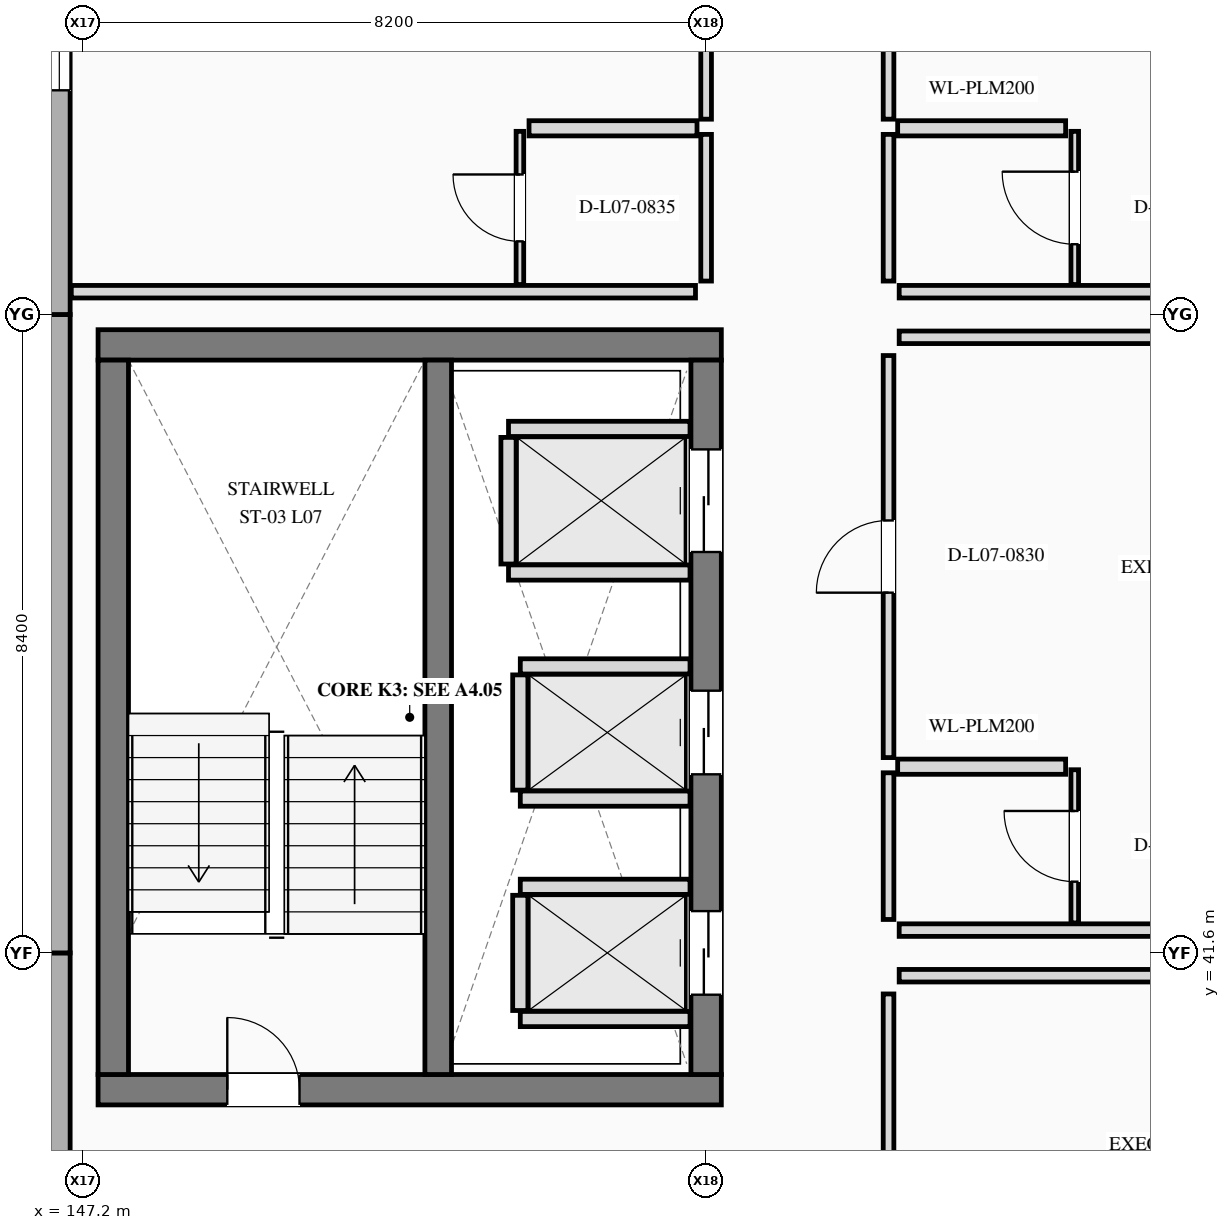
"""IFC4 building model, lengths in metres.
Left out: names, types, materials, properties, quantities, classifications, styles, units other than length and angle.
Written with IfcOpenShell. Run it as: python <this file> out.ifc"""

import sys

from ifc_helpers import new_model, si_unit, direction, frame, frame_2d, origin, place, context, subcontext, project, spatial, rectangle, extrude, element, fill, save


model = new_model("IFC4")
c1 = context("Model", 3, precision=1e-05, world=origin(), true_north=direction((0.0, 1.0)))
c2 = subcontext(c1, "Body", "Model", "MODEL_VIEW")
j1 = project(units=[si_unit("LENGTHUNIT", "METRE"), si_unit("PLANEANGLEUNIT", "RADIAN")], contexts=[c1])
p1 = place(None, origin())
s1 = spatial("IfcSite", under=j1, at=p1, CompositionType="ELEMENT")
p2 = place(p1, origin())
s2 = spatial("IfcBuilding", under=s1, at=p2, CompositionType="ELEMENT")
p3 = place(p2, frame((0.0, 0.0, 30.6)))
s3 = spatial("IfcBuildingStorey", under=s2, at=p3, CompositionType="ELEMENT", Elevation=30.6)
p4 = place(p3, frame((146.89, 33.2, 0.0), z_axis=(0.0, 0.0, 1.0), x_axis=(0.0, 1.0, 0.0)))
e1 = element("IfcWall", 1, at=p4, inside=s3, PredefinedType="STANDARD", context=c2, shape_type="SweptSolid", body=[
    extrude(rectangle(XDim=8.4, YDim=0.285, at=frame_2d((4.2, 0.0))), origin(), (0.0, 0.0, 1.0), 3.5),
])
p5 = place(p3, frame((146.89, 41.6, 0.0), z_axis=(0.0, 0.0, 1.0), x_axis=(0.0, 1.0, 0.0)))
e2 = element("IfcWall", 2, at=p5, inside=s3, PredefinedType="STANDARD", context=c2, shape_type="SweptSolid", body=[
    extrude(rectangle(XDim=8.4, YDim=0.285, at=frame_2d((4.2, 0.0))), origin(), (0.0, 0.0, 1.0), 3.5),
])
p6 = place(p3, frame((146.89, 50.0, 0.0), z_axis=(0.0, 0.0, 1.0), x_axis=(0.0, 1.0, 0.0)))
e3 = element("IfcWall", 3, at=p6, inside=s3, PredefinedType="STANDARD", context=c2, shape_type="SweptSolid", body=[
    extrude(rectangle(XDim=8.4, YDim=0.285, at=frame_2d((4.2, 0.0))), origin(), (0.0, 0.0, 1.0), 3.5),
])
p7 = place(p6, frame((2.95, 0.0, 0.85)))
e4 = element("IfcOpeningElement", 4, at=p7, cuts=e3, PredefinedType="OPENING", context=c2, shape_type="SweptSolid", body=[
    extrude(rectangle(XDim=2.5, YDim=1.75, at=frame_2d((1.25, 0.875))), frame((0.0, 0.152, 0.0), z_axis=(0.0, -1.0, 0.0), x_axis=(1.0, 0.0, 0.0)), (0.0, 0.0, 1.0), 0.305),
])
p8 = place(p3, frame((147.4, 39.8, 0.0), z_axis=(0.0, 0.0, 1.0), x_axis=(1.0, 0.0, 0.0)))
e5 = element("IfcWall", 5, at=p8, inside=s3, PredefinedType="SHEAR", context=c2, shape_type="SweptSolid", body=[
    extrude(rectangle(XDim=8.2, YDim=0.4, at=frame_2d((4.1, 0.0))), origin(), (0.0, 0.0, 1.0), 3.5),
])
p9 = place(p8, frame((1.7, 0.0, 0.0)))
e6 = element("IfcOpeningElement", 6, at=p9, cuts=e5, PredefinedType="OPENING", context=c2, shape_type="SweptSolid", body=[
    extrude(rectangle(XDim=0.95, YDim=2.2, at=frame_2d((0.475, 1.1))), frame((0.0, 0.21, 0.0), z_axis=(0.0, -1.0, 0.0), x_axis=(1.0, 0.0, 0.0)), (0.0, 0.0, 1.0), 0.42),
])
p10 = place(p3, frame((155.6, 49.6, 0.0), z_axis=(0.0, 0.0, 1.0), x_axis=(-1.0, 0.0, 0.0)))
e7 = element("IfcWall", 7, at=p10, inside=s3, PredefinedType="SHEAR", context=c2, shape_type="SweptSolid", body=[
    extrude(rectangle(XDim=8.2, YDim=0.4, at=frame_2d((4.1, 0.0))), origin(), (0.0, 0.0, 1.0), 3.5),
])
p11 = place(p3, frame((147.6, 49.4, 0.0), z_axis=(0.0, 0.0, 1.0), x_axis=(0.0, -1.0, 0.0)))
e8 = element("IfcWall", 8, at=p11, inside=s3, PredefinedType="SHEAR", context=c2, shape_type="SweptSolid", body=[
    extrude(rectangle(XDim=9.4, YDim=0.4, at=frame_2d((4.7, 0.0))), origin(), (0.0, 0.0, 1.0), 3.5),
])
p12 = place(p3, frame((155.4, 40.0, 0.0), z_axis=(0.0, 0.0, 1.0), x_axis=(0.0, 1.0, 0.0)))
e9 = element("IfcWall", 9, at=p12, inside=s3, PredefinedType="SHEAR", context=c2, shape_type="SweptSolid", body=[
    extrude(rectangle(XDim=9.4, YDim=0.4, at=frame_2d((4.7, 0.0))), origin(), (0.0, 0.0, 1.0), 3.5),
])
p13 = place(p12, frame((1.05, 0.0, 0.0)))
e10 = element("IfcOpeningElement", 10, at=p13, cuts=e9, PredefinedType="OPENING", context=c2, shape_type="SweptSolid", body=[
    extrude(rectangle(XDim=1.1, YDim=2.2, at=frame_2d((0.55, 1.1))), frame((0.0, 0.21, 0.0), z_axis=(0.0, -1.0, 0.0), x_axis=(1.0, 0.0, 0.0)), (0.0, 0.0, 1.0), 0.42),
])
p14 = place(p12, frame((3.95, 0.0, 0.0)))
e11 = element("IfcOpeningElement", 11, at=p14, cuts=e9, PredefinedType="OPENING", context=c2, shape_type="SweptSolid", body=[
    extrude(rectangle(XDim=1.1, YDim=2.2, at=frame_2d((0.55, 1.1))), frame((0.0, 0.21, 0.0), z_axis=(0.0, -1.0, 0.0), x_axis=(1.0, 0.0, 0.0)), (0.0, 0.0, 1.0), 0.42),
])
p15 = place(p12, frame((6.875, 0.0, 0.0)))
e12 = element("IfcOpeningElement", 12, at=p15, cuts=e9, PredefinedType="OPENING", context=c2, shape_type="SweptSolid", body=[
    extrude(rectangle(XDim=1.35, YDim=2.3, at=frame_2d((0.675, 1.15))), frame((0.0, 0.21, 0.0), z_axis=(0.0, -1.0, 0.0), x_axis=(1.0, 0.0, 0.0)), (0.0, 0.0, 1.0), 0.42),
])
p16 = place(p3, frame((151.875, 40.0, 0.0), z_axis=(0.0, 0.0, 1.0), x_axis=(0.0, 1.0, 0.0)))
e13 = element("IfcWall", 13, at=p16, inside=s3, PredefinedType="SHEAR", context=c2, shape_type="SweptSolid", body=[
    extrude(rectangle(XDim=9.4, YDim=0.35, at=frame_2d((4.7, 0.0))), origin(), (0.0, 0.0, 1.0), 3.5),
])
for number, where, z_axis, x_axis in (
    (14, (152.955, 40.73, 0.0), (0.0, 0.0, 1.0), (1.0, 0.0, 0.0)),
    (15, (152.955, 42.47, 0.0), (0.0, 0.0, 1.0), (1.0, 0.0, 0.0)),
):
    element("IfcWall", number, at=place(p3, frame(where, z_axis=z_axis, x_axis=x_axis)), inside=s3, PredefinedType="PLUMBINGWALL", context=c2, shape_type="SweptSolid", body=[
        extrude(rectangle(XDim=2.233, YDim=0.2, at=frame_2d((1.116, 0.0))), origin(), (0.0, 0.0, 1.0), 3.2),
    ])
p17 = place(p3, frame((152.955, 40.842, 0.0), z_axis=(0.0, 0.0, 1.0), x_axis=(0.0, 1.0, 0.0)))
e16 = element("IfcWall", 16, at=p17, inside=s3, PredefinedType="PLUMBINGWALL", context=c2, shape_type="SweptSolid", body=[
    extrude(rectangle(XDim=1.516, YDim=0.2, at=frame_2d((0.758, 0.0))), origin(), (0.0, 0.0, 1.0), 3.2),
])
for number, where, z_axis, x_axis in (
    (17, (152.955, 43.63, 0.0), (0.0, 0.0, 1.0), (1.0, 0.0, 0.0)),
    (18, (152.955, 45.37, 0.0), (0.0, 0.0, 1.0), (1.0, 0.0, 0.0)),
):
    element("IfcWall", number, at=place(p3, frame(where, z_axis=z_axis, x_axis=x_axis)), inside=s3, PredefinedType="PLUMBINGWALL", context=c2, shape_type="SweptSolid", body=[
        extrude(rectangle(XDim=2.233, YDim=0.2, at=frame_2d((1.116, 0.0))), origin(), (0.0, 0.0, 1.0), 3.2),
    ])
p18 = place(p3, frame((152.955, 43.742, 0.0), z_axis=(0.0, 0.0, 1.0), x_axis=(0.0, 1.0, 0.0)))
e19 = element("IfcWall", 19, at=p18, inside=s3, PredefinedType="PLUMBINGWALL", context=c2, shape_type="SweptSolid", body=[
    extrude(rectangle(XDim=1.516, YDim=0.2, at=frame_2d((0.758, 0.0))), origin(), (0.0, 0.0, 1.0), 3.2),
])
for number, where, z_axis, x_axis in (
    (20, (152.8, 46.605, 0.0), (0.0, 0.0, 1.0), (1.0, 0.0, 0.0)),
    (21, (152.8, 48.495, 0.0), (0.0, 0.0, 1.0), (1.0, 0.0, 0.0)),
):
    element("IfcWall", number, at=place(p3, frame(where, z_axis=z_axis, x_axis=x_axis)), inside=s3, PredefinedType="PLUMBINGWALL", context=c2, shape_type="SweptSolid", body=[
        extrude(rectangle(XDim=2.388, YDim=0.2, at=frame_2d((1.194, 0.0))), origin(), (0.0, 0.0, 1.0), 3.2),
    ])
p19 = place(p3, frame((152.8, 46.717, 0.0), z_axis=(0.0, 0.0, 1.0), x_axis=(0.0, 1.0, 0.0)))
e22 = element("IfcWall", 22, at=p19, inside=s3, PredefinedType="PLUMBINGWALL", context=c2, shape_type="SweptSolid", body=[
    extrude(rectangle(XDim=1.666, YDim=0.2, at=frame_2d((0.833, 0.0))), origin(), (0.0, 0.0, 1.0), 3.2),
])
p20 = place(p3, frame((157.8, 35.77, 0.0), z_axis=(0.0, 0.0, 1.0), x_axis=(0.0, 1.0, 0.0)))
e23 = element("IfcWall", 23, at=p20, inside=s3, PredefinedType="PARTITIONING", context=c2, shape_type="SweptSolid", body=[
    extrude(rectangle(XDim=5.29, YDim=0.14, at=frame_2d((2.645, 0.0))), origin(), (0.0, 0.0, 1.0), 3.2),
])
p21 = place(p20, frame((2.11, 0.0, 0.0)))
e24 = element("IfcOpeningElement", 24, at=p21, cuts=e23, PredefinedType="OPENING", context=c2, shape_type="SweptSolid", body=[
    extrude(rectangle(XDim=1.07, YDim=2.4, at=frame_2d((0.535, 1.2))), frame((0.0, 0.08, 0.0), z_axis=(0.0, -1.0, 0.0), x_axis=(1.0, 0.0, 0.0)), (0.0, 0.0, 1.0), 0.16),
])
p22 = place(p3, frame((157.94, 41.3, 0.0), z_axis=(0.0, 0.0, 1.0), x_axis=(1.0, 0.0, 0.0)))
e25 = element("IfcWall", 25, at=p22, inside=s3, PredefinedType="PARTITIONING", context=c2, shape_type="SweptSolid", body=[
    extrude(rectangle(XDim=8.213, YDim=0.165, at=frame_2d((4.106, 0.0))), origin(), (0.0, 0.0, 1.0), 2.59),
])
p23 = place(p3, frame((157.8, 42.04, 0.0), z_axis=(0.0, 0.0, 1.0), x_axis=(0.0, 1.0, 0.0)))
e26 = element("IfcWall", 26, at=p23, inside=s3, PredefinedType="PARTITIONING", context=c2, shape_type="SweptSolid", body=[
    extrude(rectangle(XDim=1.93, YDim=0.14, at=frame_2d((0.965, 0.0))), origin(), (0.0, 0.0, 1.0), 2.753),
])
p24 = place(p3, frame((157.8, 44.17, 0.0), z_axis=(0.0, 0.0, 1.0), x_axis=(0.0, 1.0, 0.0)))
e27 = element("IfcWall", 27, at=p24, inside=s3, PredefinedType="PARTITIONING", context=c2, shape_type="SweptSolid", body=[
    extrude(rectangle(XDim=5.29, YDim=0.14, at=frame_2d((2.645, 0.0))), origin(), (0.0, 0.0, 1.0), 2.753),
])
p25 = place(p24, frame((2.17, 0.0, 0.0)))
e28 = element("IfcOpeningElement", 28, at=p25, cuts=e27, PredefinedType="OPENING", context=c2, shape_type="SweptSolid", body=[
    extrude(rectangle(XDim=0.95, YDim=2.15, at=frame_2d((0.475, 1.075))), frame((0.0, 0.08, 0.0), z_axis=(0.0, -1.0, 0.0), x_axis=(1.0, 0.0, 0.0)), (0.0, 0.0, 1.0), 0.16),
])
for number, where, z_axis, x_axis in (
    (29, (157.94, 41.9, 0.0), (0.0, 0.0, 1.0), (1.0, 0.0, 0.0)),
    (30, (157.94, 49.7, 0.0), (0.0, 0.0, 1.0), (1.0, 0.0, 0.0)),
):
    element("IfcWall", number, at=place(p3, frame(where, z_axis=z_axis, x_axis=x_axis)), inside=s3, PredefinedType="PARTITIONING", context=c2, shape_type="SweptSolid", body=[
        extrude(rectangle(XDim=8.213, YDim=0.165, at=frame_2d((4.106, 0.0))), origin(), (0.0, 0.0, 1.0), 2.59),
    ])
p26 = place(p3, frame((157.92, 44.05, 0.0), z_axis=(0.0, 0.0, 1.0), x_axis=(1.0, 0.0, 0.0)))
e31 = element("IfcWall", 31, at=p26, inside=s3, PredefinedType="PLUMBINGWALL", context=c2, shape_type="SweptSolid", body=[
    extrude(rectangle(XDim=2.21, YDim=0.2, at=frame_2d((1.105, 0.0))), origin(), (0.0, 0.0, 1.0), 3.2),
])
p27 = place(p3, frame((160.25, 41.994, 0.0), z_axis=(0.0, 0.0, 1.0), x_axis=(0.0, 1.0, 0.0)))
e32 = element("IfcWall", 32, at=p27, inside=s3, PredefinedType="PARTITIONING", context=c2, shape_type="SweptSolid", body=[
    extrude(rectangle(XDim=2.016, YDim=0.1, at=frame_2d((1.008, 0.0))), origin(), (0.0, 0.0, 1.0), 2.753),
])
p28 = place(p27, frame((0.543, 0.0, 0.0)))
e33 = element("IfcOpeningElement", 33, at=p28, cuts=e32, PredefinedType="OPENING", context=c2, shape_type="SweptSolid", body=[
    extrude(rectangle(XDim=0.93, YDim=2.14, at=frame_2d((0.465, 1.07))), frame((0.0, 0.06, 0.0), z_axis=(0.0, -1.0, 0.0), x_axis=(1.0, 0.0, 0.0)), (0.0, 0.0, 1.0), 0.12),
])
p29 = place(p3, frame((157.8, 50.44, 0.0), z_axis=(0.0, 0.0, 1.0), x_axis=(0.0, 1.0, 0.0)))
e34 = element("IfcWall", 34, at=p29, inside=s3, PredefinedType="PARTITIONING", context=c2, shape_type="SweptSolid", body=[
    extrude(rectangle(XDim=1.93, YDim=0.14, at=frame_2d((0.965, 0.0))), origin(), (0.0, 0.0, 1.0), 3.2),
])
p30 = place(p3, frame((157.8, 52.57, 0.0), z_axis=(0.0, 0.0, 1.0), x_axis=(0.0, 1.0, 0.0)))
e35 = element("IfcWall", 35, at=p30, inside=s3, PredefinedType="PARTITIONING", context=c2, shape_type="SweptSolid", body=[
    extrude(rectangle(XDim=5.29, YDim=0.14, at=frame_2d((2.645, 0.0))), origin(), (0.0, 0.0, 1.0), 3.2),
])
p31 = place(p30, frame((2.155, 0.0, 0.0)))
e36 = element("IfcOpeningElement", 36, at=p31, cuts=e35, PredefinedType="OPENING", context=c2, shape_type="SweptSolid", body=[
    extrude(rectangle(XDim=0.98, YDim=2.2, at=frame_2d((0.49, 1.1))), frame((0.0, 0.08, 0.0), z_axis=(0.0, -1.0, 0.0), x_axis=(1.0, 0.0, 0.0)), (0.0, 0.0, 1.0), 0.16),
])
p32 = place(p3, frame((157.94, 50.3, 0.0), z_axis=(0.0, 0.0, 1.0), x_axis=(1.0, 0.0, 0.0)))
e37 = element("IfcWall", 37, at=p32, inside=s3, PredefinedType="PARTITIONING", context=c2, shape_type="SweptSolid", body=[
    extrude(rectangle(XDim=8.213, YDim=0.165, at=frame_2d((4.106, 0.0))), origin(), (0.0, 0.0, 1.0), 2.59),
])
p33 = place(p3, frame((157.92, 52.45, 0.0), z_axis=(0.0, 0.0, 1.0), x_axis=(1.0, 0.0, 0.0)))
e38 = element("IfcWall", 38, at=p33, inside=s3, PredefinedType="PLUMBINGWALL", context=c2, shape_type="SweptSolid", body=[
    extrude(rectangle(XDim=2.21, YDim=0.2, at=frame_2d((1.105, 0.0))), origin(), (0.0, 0.0, 1.0), 3.2),
])
p34 = place(p3, frame((160.25, 50.395, 0.0), z_axis=(0.0, 0.0, 1.0), x_axis=(0.0, 1.0, 0.0)))
e39 = element("IfcWall", 39, at=p34, inside=s3, PredefinedType="PARTITIONING", context=c2, shape_type="SweptSolid", body=[
    extrude(rectangle(XDim=2.015, YDim=0.1, at=frame_2d((1.008, 0.0))), origin(), (0.0, 0.0, 1.0), 3.2),
])
p35 = place(p34, frame((0.53, 0.0, 0.0)))
e40 = element("IfcOpeningElement", 40, at=p35, cuts=e39, PredefinedType="OPENING", context=c2, shape_type="SweptSolid", body=[
    extrude(rectangle(XDim=0.955, YDim=2.14, at=frame_2d((0.478, 1.07))), frame((0.0, 0.06, 0.0), z_axis=(0.0, -1.0, 0.0), x_axis=(1.0, 0.0, 0.0)), (0.0, 0.0, 1.0), 0.12),
])
p36 = place(p3, frame((155.4, 50.44, 0.0), z_axis=(0.0, 0.0, 1.0), x_axis=(0.0, 1.0, 0.0)))
e41 = element("IfcWall", 41, at=p36, inside=s3, PredefinedType="PARTITIONING", context=c2, shape_type="SweptSolid", body=[
    extrude(rectangle(XDim=1.93, YDim=0.14, at=frame_2d((0.965, 0.0))), origin(), (0.0, 0.0, 1.0), 2.59),
])
p37 = place(p3, frame((155.4, 52.57, 0.0), z_axis=(0.0, 0.0, 1.0), x_axis=(0.0, 1.0, 0.0)))
e42 = element("IfcWall", 42, at=p37, inside=s3, PredefinedType="PARTITIONING", context=c2, shape_type="SweptSolid", body=[
    extrude(rectangle(XDim=5.29, YDim=0.14, at=frame_2d((2.645, 0.0))), origin(), (0.0, 0.0, 1.0), 2.59),
])
p38 = place(p37, frame((2.14, 0.0, 0.0)))
e43 = element("IfcOpeningElement", 43, at=p38, cuts=e42, PredefinedType="OPENING", context=c2, shape_type="SweptSolid", body=[
    extrude(rectangle(XDim=1.01, YDim=2.2, at=frame_2d((0.505, 1.1))), frame((0.0, 0.08, 0.0), z_axis=(0.0, -1.0, 0.0), x_axis=(1.0, 0.0, 0.0)), (0.0, 0.0, 1.0), 0.16),
])
p39 = place(p3, frame((147.048, 50.3, 0.0), z_axis=(0.0, 0.0, 1.0), x_axis=(1.0, 0.0, 0.0)))
e44 = element("IfcWall", 44, at=p39, inside=s3, PredefinedType="PARTITIONING", context=c2, shape_type="SweptSolid", body=[
    extrude(rectangle(XDim=8.212, YDim=0.165, at=frame_2d((4.106, 0.0))), origin(), (0.0, 0.0, 1.0), 3.2),
])
p40 = place(p3, frame((153.07, 52.45, 0.0), z_axis=(0.0, 0.0, 1.0), x_axis=(1.0, 0.0, 0.0)))
e45 = element("IfcWall", 45, at=p40, inside=s3, PredefinedType="PLUMBINGWALL", context=c2, shape_type="SweptSolid", body=[
    extrude(rectangle(XDim=2.21, YDim=0.2, at=frame_2d((1.105, 0.0))), origin(), (0.0, 0.0, 1.0), 3.2),
])
p41 = place(p3, frame((152.95, 50.395, 0.0), z_axis=(0.0, 0.0, 1.0), x_axis=(0.0, 1.0, 0.0)))
e46 = element("IfcWall", 46, at=p41, inside=s3, PredefinedType="PARTITIONING", context=c2, shape_type="SweptSolid", body=[
    extrude(rectangle(XDim=2.015, YDim=0.1, at=frame_2d((1.008, 0.0))), origin(), (0.0, 0.0, 1.0), 3.2),
])
p42 = place(p41, frame((0.568, 0.0, 0.0)))
e47 = element("IfcOpeningElement", 47, at=p42, cuts=e46, PredefinedType="OPENING", context=c2, shape_type="SweptSolid", body=[
    extrude(rectangle(XDim=0.88, YDim=2.18, at=frame_2d((0.44, 1.09))), frame((0.0, 0.06, 0.0), z_axis=(0.0, -1.0, 0.0), x_axis=(1.0, 0.0, 0.0)), (0.0, 0.0, 1.0), 0.12),
])
p43 = place(p7, origin())
e48 = element("IfcWindow", 48, at=p43, inside=s3, PartitioningType="SINGLE_PANEL", PredefinedType="WINDOW", context=c2, shape_type="SweptSolid", body=[
    extrude(rectangle(XDim=2.5, YDim=1.75, at=frame_2d((1.25, 0.875))), frame((0.0, 0.03, 0.0), z_axis=(0.0, -1.0, 0.0), x_axis=(1.0, 0.0, 0.0)), (0.0, 0.0, 1.0), 0.06),
])
fill(e4, e48)
p44 = place(p9, origin())
e49 = element("IfcDoor", 49, at=p44, inside=s3, OperationType="SINGLE_SWING_LEFT", PredefinedType="DOOR", context=c2, shape_type="SweptSolid", body=[
    extrude(rectangle(XDim=0.95, YDim=2.2, at=frame_2d((0.475, 1.1))), frame((0.0, 0.025, 0.0), z_axis=(0.0, -1.0, 0.0), x_axis=(1.0, 0.0, 0.0)), (0.0, 0.0, 1.0), 0.05),
])
fill(e6, e49)
p45 = place(p13, origin())
e50 = element("IfcDoor", 50, at=p45, inside=s3, OperationType="SLIDING_TO_LEFT", PredefinedType="DOOR", context=c2, shape_type="SweptSolid", body=[
    extrude(rectangle(XDim=1.1, YDim=2.2, at=frame_2d((0.55, 1.1))), frame((0.0, 0.025, 0.0), z_axis=(0.0, -1.0, 0.0), x_axis=(1.0, 0.0, 0.0)), (0.0, 0.0, 1.0), 0.05),
])
fill(e10, e50)
p46 = place(p14, origin())
e51 = element("IfcDoor", 51, at=p46, inside=s3, OperationType="SLIDING_TO_RIGHT", PredefinedType="DOOR", context=c2, shape_type="SweptSolid", body=[
    extrude(rectangle(XDim=1.1, YDim=2.2, at=frame_2d((0.55, 1.1))), frame((0.0, 0.025, 0.0), z_axis=(0.0, -1.0, 0.0), x_axis=(1.0, 0.0, 0.0)), (0.0, 0.0, 1.0), 0.05),
])
fill(e11, e51)
p47 = place(p15, origin())
e52 = element("IfcDoor", 52, at=p47, inside=s3, OperationType="SLIDING_TO_LEFT", PredefinedType="DOOR", context=c2, shape_type="SweptSolid", body=[
    extrude(rectangle(XDim=1.35, YDim=2.3, at=frame_2d((0.675, 1.15))), frame((0.0, 0.025, 0.0), z_axis=(0.0, -1.0, 0.0), x_axis=(1.0, 0.0, 0.0)), (0.0, 0.0, 1.0), 0.05),
])
fill(e12, e52)
p48 = place(p25, origin())
e53 = element("IfcDoor", 53, at=p48, inside=s3, OperationType="SINGLE_SWING_LEFT", PredefinedType="DOOR", context=c2, shape_type="SweptSolid", body=[
    extrude(rectangle(XDim=0.95, YDim=2.15, at=frame_2d((0.475, 1.075))), frame((0.0, 0.025, 0.0), z_axis=(0.0, -1.0, 0.0), x_axis=(1.0, 0.0, 0.0)), (0.0, 0.0, 1.0), 0.05),
])
fill(e28, e53)
p49 = place(p28, origin())
e54 = element("IfcDoor", 54, at=p49, inside=s3, OperationType="SINGLE_SWING_RIGHT", PredefinedType="DOOR", context=c2, shape_type="SweptSolid", body=[
    extrude(rectangle(XDim=0.93, YDim=2.14, at=frame_2d((0.465, 1.07))), frame((0.0, 0.025, 0.0), z_axis=(0.0, -1.0, 0.0), x_axis=(1.0, 0.0, 0.0)), (0.0, 0.0, 1.0), 0.05),
])
fill(e33, e54)
p50 = place(p35, origin())
e55 = element("IfcDoor", 55, at=p50, inside=s3, OperationType="SINGLE_SWING_RIGHT", PredefinedType="DOOR", context=c2, shape_type="SweptSolid", body=[
    extrude(rectangle(XDim=0.955, YDim=2.14, at=frame_2d((0.478, 1.07))), frame((0.0, 0.025, 0.0), z_axis=(0.0, -1.0, 0.0), x_axis=(1.0, 0.0, 0.0)), (0.0, 0.0, 1.0), 0.05),
])
fill(e40, e55)
p51 = place(p42, origin())
e56 = element("IfcDoor", 56, at=p51, inside=s3, OperationType="SINGLE_SWING_RIGHT", PredefinedType="DOOR", context=c2, shape_type="SweptSolid", body=[
    extrude(rectangle(XDim=0.88, YDim=2.18, at=frame_2d((0.44, 1.09))), frame((0.0, 0.025, 0.0), z_axis=(0.0, -1.0, 0.0), x_axis=(1.0, 0.0, 0.0)), (0.0, 0.0, 1.0), 0.05),
])
fill(e47, e56)
save(model, sys.argv[1])
